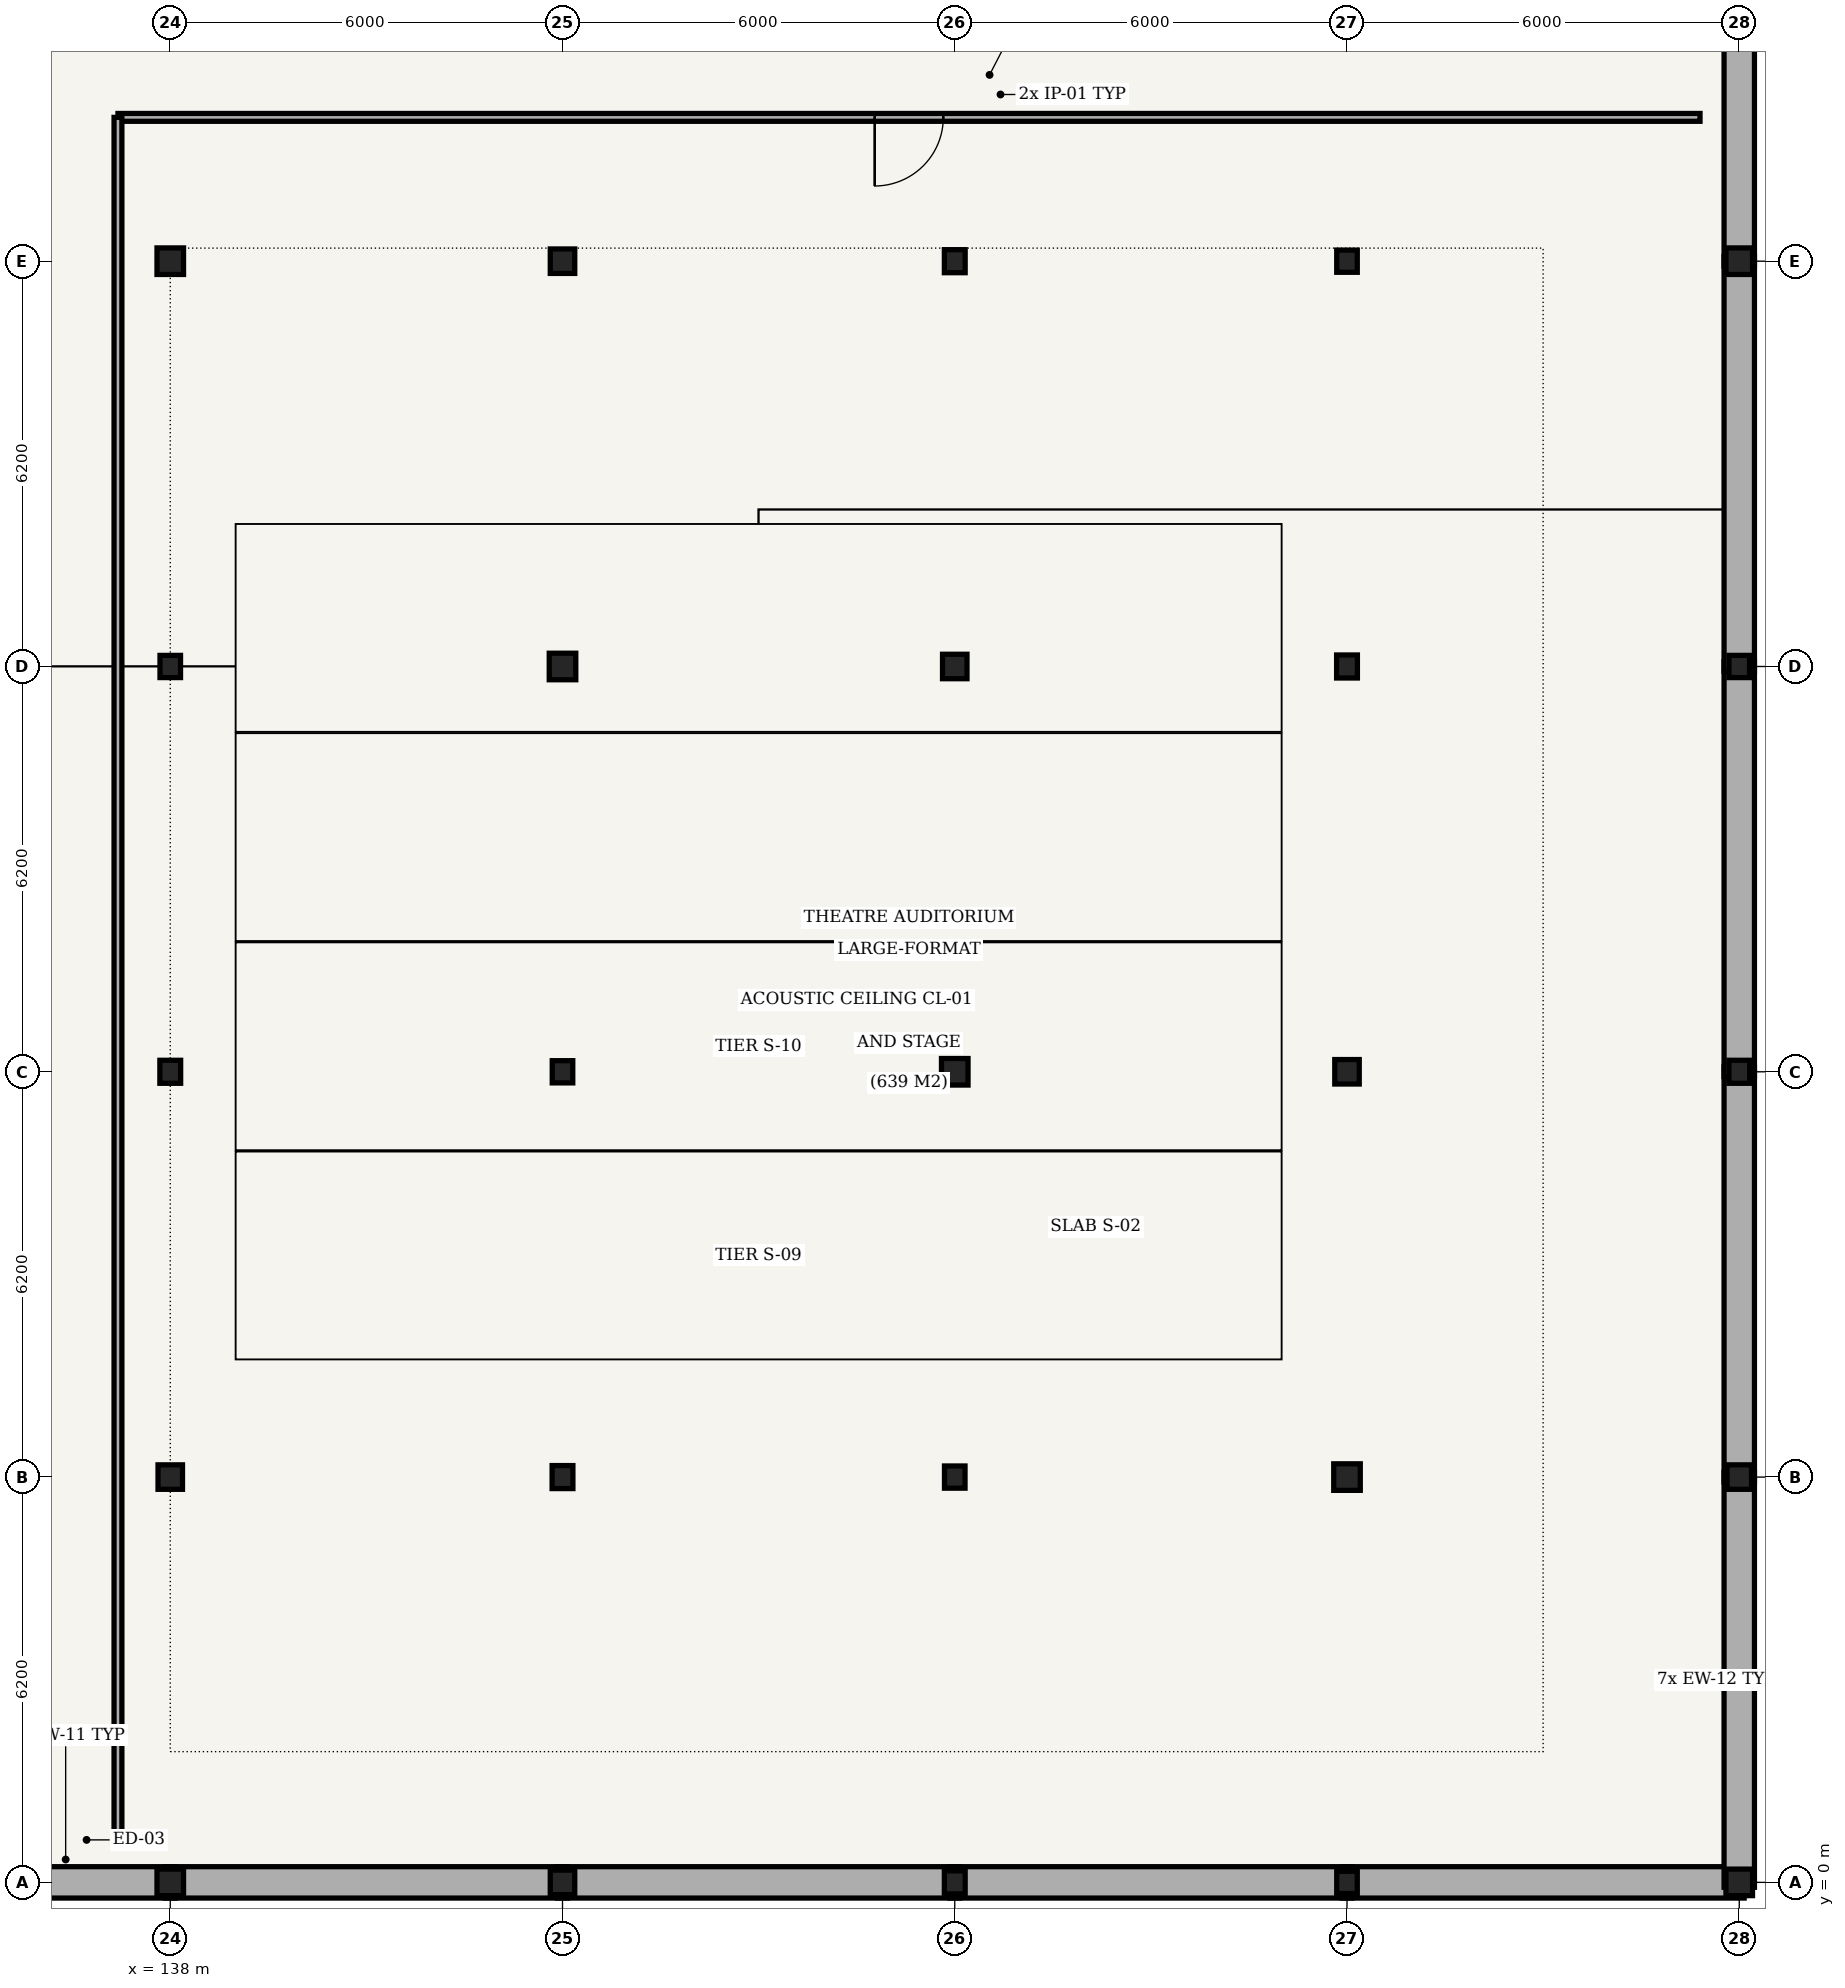
"""IFC4 building model, lengths in metres.
Left out: names, types, materials, properties, quantities, classifications, styles, units other than length and angle.
Written with IfcOpenShell. Run it as: python <this file> out.ifc"""

import sys

from ifc_helpers import new_model, si_unit, direction, frame, frame_2d, origin, origin_2d, place, context, subcontext, project, spatial, rectangle, hollow_circle, i_section, extrude, element, fill, save


model = new_model("IFC4")
c1 = context("Model", 3, precision=1e-05, world=origin(), true_north=direction((0.0, 1.0)))
c2 = subcontext(c1, "Body", "Model", "MODEL_VIEW")
j1 = project(units=[si_unit("LENGTHUNIT", "METRE"), si_unit("PLANEANGLEUNIT", "RADIAN")], contexts=[c1])
p1 = place(None, origin())
s1 = spatial("IfcSite", under=j1, at=p1, CompositionType="ELEMENT")
p2 = place(p1, origin())
s2 = spatial("IfcBuilding", under=s1, at=p2, CompositionType="ELEMENT")
p3 = place(p2, origin())
s3 = spatial("IfcBuildingStorey", under=s2, at=p3, CompositionType="ELEMENT", Elevation=0.0)
p4 = place(p3, frame((138.0, 0.0, -5.8), z_axis=(0.0, 0.0, 1.0), x_axis=(1.0, 0.0, 0.0)))
e1 = element("IfcColumn", 1, at=p4, inside=s3, PredefinedType="COLUMN", context=c2, shape_type="SweptSolid", body=[
    extrude(hollow_circle(Radius=0.203, WallThickness=0.016, at=origin_2d()), origin(), (0.0, 0.0, 1.0), 11.2),
])
p5 = place(p3, frame((138.0, 6.2, -5.8), z_axis=(0.0, 0.0, 1.0), x_axis=(1.0, 0.0, 0.0)))
e2 = element("IfcColumn", 2, at=p5, inside=s3, PredefinedType="COLUMN", context=c2, shape_type="SweptSolid", body=[
    extrude(i_section(OverallWidth=0.375, OverallDepth=0.375, WebThickness=0.017, FlangeThickness=0.027, FilletRadius=0.015, at=origin_2d()), origin(), (0.0, 0.0, 1.0), 11.2),
])
p6 = place(p3, frame((138.0, 12.4, -5.8), z_axis=(0.0, 0.0, 1.0), x_axis=(1.0, 0.0, 0.0)))
e3 = element("IfcColumn", 3, at=p6, inside=s3, PredefinedType="COLUMN", context=c2, shape_type="SweptSolid", body=[
    extrude(i_section(OverallWidth=0.318, OverallDepth=0.353, WebThickness=0.023, FlangeThickness=0.038, FilletRadius=0.015, at=origin_2d()), origin(), (0.0, 0.0, 1.0), 11.2),
])
p7 = place(p3, frame((138.0, 18.6, -5.8), z_axis=(0.0, 0.0, 1.0), x_axis=(1.0, 0.0, 0.0)))
e4 = element("IfcColumn", 4, at=p7, inside=s3, PredefinedType="COLUMN", context=c2, shape_type="SweptSolid", body=[
    extrude(i_section(OverallWidth=0.314, OverallDepth=0.34, WebThickness=0.019, FlangeThickness=0.031, FilletRadius=0.015, at=origin_2d()), origin(), (0.0, 0.0, 1.0), 11.2),
])
p8 = place(p3, frame((138.0, 24.8, -5.8), z_axis=(0.0, 0.0, 1.0), x_axis=(1.0, 0.0, 0.0)))
e5 = element("IfcColumn", 5, at=p8, inside=s3, PredefinedType="COLUMN", context=c2, shape_type="SweptSolid", body=[
    extrude(hollow_circle(Radius=0.203, WallThickness=0.016, at=origin_2d()), origin(), (0.0, 0.0, 1.0), 11.2),
])
p9 = place(p3, frame((144.0, 0.0, -5.8), z_axis=(0.0, 0.0, 1.0), x_axis=(1.0, 0.0, 0.0)))
e6 = element("IfcColumn", 6, at=p9, inside=s3, PredefinedType="COLUMN", context=c2, shape_type="SweptSolid", body=[
    extrude(i_section(OverallWidth=0.375, OverallDepth=0.375, WebThickness=0.017, FlangeThickness=0.027, FilletRadius=0.015, at=origin_2d()), origin(), (0.0, 0.0, 1.0), 11.2),
])
p10 = place(p3, frame((144.0, 6.2, -5.8), z_axis=(0.0, 0.0, 1.0), x_axis=(1.0, 0.0, 0.0)))
e7 = element("IfcColumn", 7, at=p10, inside=s3, PredefinedType="COLUMN", context=c2, shape_type="SweptSolid", body=[
    extrude(i_section(OverallWidth=0.318, OverallDepth=0.353, WebThickness=0.023, FlangeThickness=0.038, FilletRadius=0.015, at=origin_2d()), origin(), (0.0, 0.0, 1.0), 11.2),
])
p11 = place(p3, frame((144.0, 12.4, -5.8), z_axis=(0.0, 0.0, 1.0), x_axis=(1.0, 0.0, 0.0)))
e8 = element("IfcColumn", 8, at=p11, inside=s3, PredefinedType="COLUMN", context=c2, shape_type="SweptSolid", body=[
    extrude(i_section(OverallWidth=0.314, OverallDepth=0.34, WebThickness=0.019, FlangeThickness=0.031, FilletRadius=0.015, at=origin_2d()), origin(), (0.0, 0.0, 1.0), 5.5),
])
p12 = place(p3, frame((144.0, 18.6, -5.8), z_axis=(0.0, 0.0, 1.0), x_axis=(1.0, 0.0, 0.0)))
e9 = element("IfcColumn", 9, at=p12, inside=s3, PredefinedType="COLUMN", context=c2, shape_type="SweptSolid", body=[
    extrude(hollow_circle(Radius=0.203, WallThickness=0.016, at=origin_2d()), origin(), (0.0, 0.0, 1.0), 11.2),
])
p13 = place(p3, frame((144.0, 24.8, -5.8), z_axis=(0.0, 0.0, 1.0), x_axis=(1.0, 0.0, 0.0)))
e10 = element("IfcColumn", 10, at=p13, inside=s3, PredefinedType="COLUMN", context=c2, shape_type="SweptSolid", body=[
    extrude(i_section(OverallWidth=0.375, OverallDepth=0.375, WebThickness=0.017, FlangeThickness=0.027, FilletRadius=0.015, at=origin_2d()), origin(), (0.0, 0.0, 1.0), 11.2),
])
p14 = place(p3, frame((150.0, 0.0, -5.8), z_axis=(0.0, 0.0, 1.0), x_axis=(1.0, 0.0, 0.0)))
e11 = element("IfcColumn", 11, at=p14, inside=s3, PredefinedType="COLUMN", context=c2, shape_type="SweptSolid", body=[
    extrude(i_section(OverallWidth=0.318, OverallDepth=0.353, WebThickness=0.023, FlangeThickness=0.038, FilletRadius=0.015, at=origin_2d()), origin(), (0.0, 0.0, 1.0), 11.2),
])
p15 = place(p3, frame((150.0, 6.2, -5.8), z_axis=(0.0, 0.0, 1.0), x_axis=(1.0, 0.0, 0.0)))
e12 = element("IfcColumn", 12, at=p15, inside=s3, PredefinedType="COLUMN", context=c2, shape_type="SweptSolid", body=[
    extrude(i_section(OverallWidth=0.314, OverallDepth=0.34, WebThickness=0.019, FlangeThickness=0.031, FilletRadius=0.015, at=origin_2d()), origin(), (0.0, 0.0, 1.0), 11.2),
])
p16 = place(p3, frame((150.0, 12.4, -5.8), z_axis=(0.0, 0.0, 1.0), x_axis=(1.0, 0.0, 0.0)))
e13 = element("IfcColumn", 13, at=p16, inside=s3, PredefinedType="COLUMN", context=c2, shape_type="SweptSolid", body=[
    extrude(hollow_circle(Radius=0.203, WallThickness=0.016, at=origin_2d()), origin(), (0.0, 0.0, 1.0), 11.2),
])
p17 = place(p3, frame((150.0, 18.6, -5.8), z_axis=(0.0, 0.0, 1.0), x_axis=(1.0, 0.0, 0.0)))
e14 = element("IfcColumn", 14, at=p17, inside=s3, PredefinedType="COLUMN", context=c2, shape_type="SweptSolid", body=[
    extrude(i_section(OverallWidth=0.375, OverallDepth=0.375, WebThickness=0.017, FlangeThickness=0.027, FilletRadius=0.015, at=origin_2d()), origin(), (0.0, 0.0, 1.0), 11.2),
])
p18 = place(p3, frame((150.0, 24.8, -5.8), z_axis=(0.0, 0.0, 1.0), x_axis=(1.0, 0.0, 0.0)))
e15 = element("IfcColumn", 15, at=p18, inside=s3, PredefinedType="COLUMN", context=c2, shape_type="SweptSolid", body=[
    extrude(i_section(OverallWidth=0.318, OverallDepth=0.353, WebThickness=0.023, FlangeThickness=0.038, FilletRadius=0.015, at=origin_2d()), origin(), (0.0, 0.0, 1.0), 11.2),
])
p19 = place(p3, frame((156.0, 0.0, -5.8), z_axis=(0.0, 0.0, 1.0), x_axis=(1.0, 0.0, 0.0)))
e16 = element("IfcColumn", 16, at=p19, inside=s3, PredefinedType="COLUMN", context=c2, shape_type="SweptSolid", body=[
    extrude(i_section(OverallWidth=0.314, OverallDepth=0.34, WebThickness=0.019, FlangeThickness=0.031, FilletRadius=0.015, at=origin_2d()), origin(), (0.0, 0.0, 1.0), 11.2),
])
p20 = place(p3, frame((156.0, 6.2, -5.8), z_axis=(0.0, 0.0, 1.0), x_axis=(1.0, 0.0, 0.0)))
e17 = element("IfcColumn", 17, at=p20, inside=s3, PredefinedType="COLUMN", context=c2, shape_type="SweptSolid", body=[
    extrude(hollow_circle(Radius=0.203, WallThickness=0.016, at=origin_2d()), origin(), (0.0, 0.0, 1.0), 11.2),
])
p21 = place(p3, frame((156.0, 12.4, -5.8), z_axis=(0.0, 0.0, 1.0), x_axis=(1.0, 0.0, 0.0)))
e18 = element("IfcColumn", 18, at=p21, inside=s3, PredefinedType="COLUMN", context=c2, shape_type="SweptSolid", body=[
    extrude(i_section(OverallWidth=0.375, OverallDepth=0.375, WebThickness=0.017, FlangeThickness=0.027, FilletRadius=0.015, at=origin_2d()), origin(), (0.0, 0.0, 1.0), 11.2),
])
p22 = place(p3, frame((156.0, 18.6, -5.8), z_axis=(0.0, 0.0, 1.0), x_axis=(1.0, 0.0, 0.0)))
e19 = element("IfcColumn", 19, at=p22, inside=s3, PredefinedType="COLUMN", context=c2, shape_type="SweptSolid", body=[
    extrude(i_section(OverallWidth=0.318, OverallDepth=0.353, WebThickness=0.023, FlangeThickness=0.038, FilletRadius=0.015, at=origin_2d()), origin(), (0.0, 0.0, 1.0), 11.2),
])
p23 = place(p3, frame((156.0, 24.8, -5.8), z_axis=(0.0, 0.0, 1.0), x_axis=(1.0, 0.0, 0.0)))
e20 = element("IfcColumn", 20, at=p23, inside=s3, PredefinedType="COLUMN", context=c2, shape_type="SweptSolid", body=[
    extrude(i_section(OverallWidth=0.314, OverallDepth=0.34, WebThickness=0.019, FlangeThickness=0.031, FilletRadius=0.015, at=origin_2d()), origin(), (0.0, 0.0, 1.0), 11.2),
])
p24 = place(p3, frame((162.0, 0.0, -5.8), z_axis=(0.0, 0.0, 1.0), x_axis=(1.0, 0.0, 0.0)))
e21 = element("IfcColumn", 21, at=p24, inside=s3, PredefinedType="COLUMN", context=c2, shape_type="SweptSolid", body=[
    extrude(hollow_circle(Radius=0.203, WallThickness=0.016, at=origin_2d()), origin(), (0.0, 0.0, 1.0), 11.2),
])
p25 = place(p3, frame((162.0, 6.2, -5.8), z_axis=(0.0, 0.0, 1.0), x_axis=(1.0, 0.0, 0.0)))
e22 = element("IfcColumn", 22, at=p25, inside=s3, PredefinedType="COLUMN", context=c2, shape_type="SweptSolid", body=[
    extrude(i_section(OverallWidth=0.375, OverallDepth=0.375, WebThickness=0.017, FlangeThickness=0.027, FilletRadius=0.015, at=origin_2d()), origin(), (0.0, 0.0, 1.0), 11.2),
])
p26 = place(p3, frame((162.0, 12.4, -5.8), z_axis=(0.0, 0.0, 1.0), x_axis=(1.0, 0.0, 0.0)))
e23 = element("IfcColumn", 23, at=p26, inside=s3, PredefinedType="COLUMN", context=c2, shape_type="SweptSolid", body=[
    extrude(i_section(OverallWidth=0.318, OverallDepth=0.353, WebThickness=0.023, FlangeThickness=0.038, FilletRadius=0.015, at=origin_2d()), origin(), (0.0, 0.0, 1.0), 11.2),
])
p27 = place(p3, frame((162.0, 18.6, -5.8), z_axis=(0.0, 0.0, 1.0), x_axis=(1.0, 0.0, 0.0)))
e24 = element("IfcColumn", 24, at=p27, inside=s3, PredefinedType="COLUMN", context=c2, shape_type="SweptSolid", body=[
    extrude(i_section(OverallWidth=0.314, OverallDepth=0.34, WebThickness=0.019, FlangeThickness=0.031, FilletRadius=0.015, at=origin_2d()), origin(), (0.0, 0.0, 1.0), 11.2),
])
p28 = place(p3, frame((162.0, 24.8, -5.8), z_axis=(0.0, 0.0, 1.0), x_axis=(1.0, 0.0, 0.0)))
e25 = element("IfcColumn", 25, at=p28, inside=s3, PredefinedType="COLUMN", context=c2, shape_type="SweptSolid", body=[
    extrude(hollow_circle(Radius=0.203, WallThickness=0.016, at=origin_2d()), origin(), (0.0, 0.0, 1.0), 11.2),
])
p29 = place(p3, frame((131.925, 0.0, 0.0), z_axis=(0.0, 0.0, 1.0), x_axis=(1.0, 0.0, 0.0)))
e26 = element("IfcWall", 26, at=p29, inside=s3, PredefinedType="SOLIDWALL", context=c2, shape_type="SweptSolid", body=[
    extrude(rectangle(XDim=6.15, YDim=0.48, at=frame_2d((3.075, 0.0))), origin(), (0.0, 0.0, 1.0), 4.44),
])
p30 = place(p29, frame((2.175, 0.0, 0.0)))
e27 = element("IfcOpeningElement", 27, at=p30, cuts=e26, PredefinedType="OPENING", context=c2, shape_type="SweptSolid", body=[
    extrude(rectangle(XDim=1.8, YDim=2.3, at=frame_2d((0.9, 1.15))), frame((0.0, 0.25, 0.0), z_axis=(0.0, -1.0, 0.0), x_axis=(1.0, 0.0, 0.0)), (0.0, 0.0, 1.0), 0.5),
])
for number, where, z_axis, x_axis in (
    (28, (137.925, 0.0, 0.0), (0.0, 0.0, 1.0), (1.0, 0.0, 0.0)),
    (29, (143.925, 0.0, 0.0), (0.0, 0.0, 1.0), (1.0, 0.0, 0.0)),
    (30, (149.925, 0.0, 0.0), (0.0, 0.0, 1.0), (1.0, 0.0, 0.0)),
    (31, (155.925, 0.0, 0.0), (0.0, 0.0, 1.0), (1.0, 0.0, 0.0)),
):
    element("IfcWall", number, at=place(p3, frame(where, z_axis=z_axis, x_axis=x_axis)), inside=s3, PredefinedType="SOLIDWALL", context=c2, shape_type="SweptSolid", body=[
        extrude(rectangle(XDim=6.15, YDim=0.48, at=frame_2d((3.075, 0.0))), origin(), (0.0, 0.0, 1.0), 4.44),
    ])
p31 = place(p3, frame((162.0, -0.075, 0.0), z_axis=(0.0, 0.0, 1.0), x_axis=(0.0, 1.0, 0.0)))
e32 = element("IfcWall", 32, at=p31, inside=s3, PredefinedType="SOLIDWALL", context=c2, shape_type="SweptSolid", body=[
    extrude(rectangle(XDim=6.35, YDim=0.465, at=frame_2d((3.175, 0.0))), origin(), (0.0, 0.0, 1.0), 4.44),
])
for number, where, z_axis, x_axis in (
    (33, (162.0, 6.125, 0.0), (0.0, 0.0, 1.0), (0.0, 1.0, 0.0)),
    (34, (162.0, 12.325, 0.0), (0.0, 0.0, 1.0), (0.0, 1.0, 0.0)),
    (35, (162.0, 18.525, 0.0), (0.0, 0.0, 1.0), (0.0, 1.0, 0.0)),
):
    element("IfcWall", number, at=place(p3, frame(where, z_axis=z_axis, x_axis=x_axis)), inside=s3, PredefinedType="SOLIDWALL", context=c2, shape_type="SweptSolid", body=[
        extrude(rectangle(XDim=6.35, YDim=0.465, at=frame_2d((3.175, 0.0))), origin(), (0.0, 0.0, 1.0), 4.44),
    ])
p32 = place(p3, frame((162.0, 24.725, 0.0), z_axis=(0.0, 0.0, 1.0), x_axis=(0.0, 1.0, 0.0)))
e36 = element("IfcWall", 36, at=p32, inside=s3, PredefinedType="SOLIDWALL", context=c2, shape_type="SweptSolid", body=[
    extrude(rectangle(XDim=6.35, YDim=0.465, at=frame_2d((3.175, 0.0))), origin(), (0.0, 0.0, 1.0), 4.44),
])
p33 = place(p3, frame((137.2, 27.0, 0.0), z_axis=(0.0, 0.0, 1.0), x_axis=(1.0, 0.0, 0.0)))
e37 = element("IfcWall", 37, at=p33, inside=s3, PredefinedType="PARTITIONING", context=c2, shape_type="SweptSolid", body=[
    extrude(rectangle(XDim=24.2, YDim=0.12, at=frame_2d((12.1, 0.0))), origin(), (0.0, 0.0, 1.0), 4.35),
])
p34 = place(p33, frame((11.575, 0.0, 0.0)))
e38 = element("IfcOpeningElement", 38, at=p34, cuts=e37, PredefinedType="OPENING", context=c2, shape_type="SweptSolid", body=[
    extrude(rectangle(XDim=1.05, YDim=2.1, at=frame_2d((0.525, 1.05))), frame((0.0, 0.07, 0.0), z_axis=(0.0, -1.0, 0.0), x_axis=(1.0, 0.0, 0.0)), (0.0, 0.0, 1.0), 0.14),
])
p35 = place(p3, frame((137.2, 0.6, 0.0), z_axis=(0.0, 0.0, 1.0), x_axis=(0.0, 1.0, 0.0)))
e39 = element("IfcWall", 39, at=p35, inside=s3, PredefinedType="PARTITIONING", context=c2, shape_type="SweptSolid", body=[
    extrude(rectangle(XDim=26.4, YDim=0.12, at=frame_2d((13.2, 0.0))), origin(), (0.0, 0.0, 1.0), 4.35),
])
p36 = place(p34, origin())
e40 = element("IfcDoor", 40, at=p36, inside=s3, OperationType="SINGLE_SWING_RIGHT", PredefinedType="DOOR", context=c2, shape_type="SweptSolid", body=[
    extrude(rectangle(XDim=1.05, YDim=2.1, at=frame_2d((0.525, 1.05))), frame((0.0, 0.025, 0.0), z_axis=(0.0, -1.0, 0.0), x_axis=(1.0, 0.0, 0.0)), (0.0, 0.0, 1.0), 0.05),
])
fill(e38, e40)
save(model, sys.argv[1])
